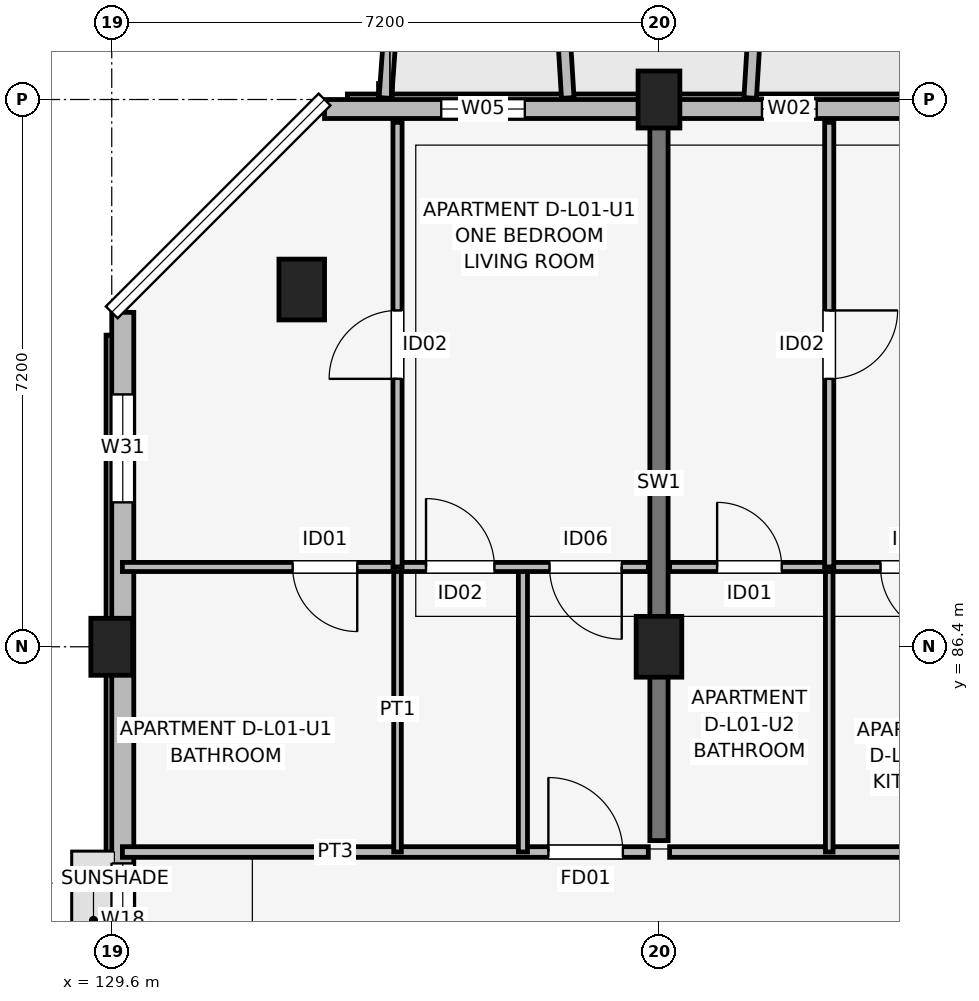
"""IFC4 building model, lengths in metres.
Left out: names, types, materials, properties, quantities, classifications, styles, units other than length and angle.
Written with IfcOpenShell. Run it as: python <this file> out.ifc"""

import sys

from ifc_helpers import new_model, si_unit, direction, frame, frame_2d, origin, origin_2d, place, context, subcontext, project, spatial, rectangle, extrude, element, fill, save


model = new_model("IFC4")
c1 = context("Model", 3, precision=1e-05, world=origin(), true_north=direction((0.0, 1.0)))
c2 = subcontext(c1, "Body", "Model", "MODEL_VIEW")
j1 = project(units=[si_unit("LENGTHUNIT", "METRE"), si_unit("PLANEANGLEUNIT", "RADIAN")], contexts=[c1])
p1 = place(None, origin())
s1 = spatial("IfcSite", under=j1, at=p1, CompositionType="ELEMENT")
p2 = place(p1, origin())
s2 = spatial("IfcBuilding", under=s1, at=p2, CompositionType="ELEMENT")
p3 = place(p2, frame((0.0, 0.0, 4.5)))
s3 = spatial("IfcBuildingStorey", under=s2, at=p3, CompositionType="ELEMENT", Elevation=4.5)
p4 = place(p3, frame((129.6, 86.4, 0.0), z_axis=(0.0, 0.0, 1.0), x_axis=(1.0, 0.0, 0.0)))
e1 = element("IfcColumn", 1, at=p4, inside=s3, PredefinedType="COLUMN", context=c2, shape_type="SweptSolid", body=[
    extrude(rectangle(XDim=0.55, YDim=0.75, at=origin_2d()), origin(), (0.0, 0.0, 1.0), 4.2),
])
for number, where, z_axis, x_axis in (
    (2, (132.1, 91.1, 0.0), (0.0, 0.0, 1.0), (1.0, 0.0, 0.0)),
    (3, (136.8, 86.4, 0.0), (0.0, 0.0, 1.0), (1.0, 0.0, 0.0)),
):
    element("IfcColumn", number, at=place(p3, frame(where, z_axis=z_axis, x_axis=x_axis)), inside=s3, PredefinedType="COLUMN", context=c2, shape_type="SweptSolid", body=[
        extrude(rectangle(XDim=0.6, YDim=0.8, at=origin_2d()), origin(), (0.0, 0.0, 1.0), 4.2),
    ])
p5 = place(p3, frame((136.8, 93.6, 0.0), z_axis=(0.0, 0.0, 1.0), x_axis=(1.0, 0.0, 0.0)))
e4 = element("IfcColumn", 4, at=p5, inside=s3, PredefinedType="COLUMN", context=c2, shape_type="SweptSolid", body=[
    extrude(rectangle(XDim=0.55, YDim=0.75, at=origin_2d()), origin(), (0.0, 0.0, 1.0), 4.2),
])
p6 = place(p3, frame((136.8, 83.85, 0.0), z_axis=(0.0, 0.0, 1.0), x_axis=(0.0, 1.0, 0.0)))
e5 = element("IfcWall", 5, at=p6, inside=s3, PredefinedType="SHEAR", context=c2, shape_type="SweptSolid", body=[
    extrude(rectangle(XDim=9.4, YDim=0.24, at=frame_2d((4.7, 0.0))), origin(), (0.0, 0.0, 1.0), 4.2),
])
p7 = place(p3, frame((162.8, 93.475, 0.0), z_axis=(0.0, 0.0, 1.0), x_axis=(-1.0, 0.0, 0.0)))
e6 = element("IfcWall", 6, at=p7, inside=s3, PredefinedType="SOLIDWALL", context=c2, shape_type="SweptSolid", body=[
    extrude(rectangle(XDim=30.4, YDim=0.25, at=frame_2d((15.2, 0.0))), origin(), (0.0, 0.0, 1.0), 3.48),
])
p8 = place(p7, frame((21.95, 0.0, 0.0), z_axis=(0.0, 0.0, 1.0), x_axis=(-1.0, 0.0, 0.0)))
e7 = element("IfcOpeningElement", 7, at=p8, cuts=e6, PredefinedType="OPENING", context=c2, shape_type="SweptSolid", body=[
    extrude(rectangle(XDim=1.5, YDim=2.15, at=frame_2d((0.75, 1.075))), frame((0.0, 0.135, 0.0), z_axis=(0.0, -1.0, 0.0), x_axis=(1.0, 0.0, 0.0)), (0.0, 0.0, 1.0), 0.27),
])
p9 = place(p7, frame((7.7, 0.0, 0.0), z_axis=(0.0, 0.0, 1.0), x_axis=(-1.0, 0.0, 0.0)))
e8 = element("IfcOpeningElement", 8, at=p9, cuts=e6, PredefinedType="OPENING", context=c2, shape_type="SweptSolid", body=[
    extrude(rectangle(XDim=1.8, YDim=2.15, at=frame_2d((0.9, 1.075))), frame((0.0, 0.135, 0.0), z_axis=(0.0, -1.0, 0.0), x_axis=(1.0, 0.0, 0.0)), (0.0, 0.0, 1.0), 0.27),
])
p10 = place(p7, frame((27.765, 0.0, 0.75)))
e9 = element("IfcOpeningElement", 9, at=p10, cuts=e6, PredefinedType="OPENING", context=c2, shape_type="SweptSolid", body=[
    extrude(rectangle(XDim=1.1, YDim=1.5, at=frame_2d((0.55, 0.75))), frame((0.0, 0.135, 0.0), z_axis=(0.0, -1.0, 0.0), x_axis=(1.0, 0.0, 0.0)), (0.0, 0.0, 1.0), 0.27),
])
p11 = place(p7, frame((23.925, 0.0, 0.75)))
e10 = element("IfcOpeningElement", 10, at=p11, cuts=e6, PredefinedType="OPENING", context=c2, shape_type="SweptSolid", body=[
    extrude(rectangle(XDim=0.72, YDim=1.35, at=frame_2d((0.36, 0.675))), frame((0.0, 0.135, 0.0), z_axis=(0.0, -1.0, 0.0), x_axis=(1.0, 0.0, 0.0)), (0.0, 0.0, 1.0), 0.27),
])
p12 = place(p7, frame((15.325, 0.0, 0.7)))
e11 = element("IfcOpeningElement", 11, at=p12, cuts=e6, PredefinedType="OPENING", context=c2, shape_type="SweptSolid", body=[
    extrude(rectangle(XDim=2.15, YDim=1.65, at=frame_2d((1.075, 0.825))), frame((0.0, 0.135, 0.0), z_axis=(0.0, -1.0, 0.0), x_axis=(1.0, 0.0, 0.0)), (0.0, 0.0, 1.0), 0.27),
])
p13 = place(p7, frame((9.525, 0.0, 0.75)))
e12 = element("IfcOpeningElement", 12, at=p13, cuts=e6, PredefinedType="OPENING", context=c2, shape_type="SweptSolid", body=[
    extrude(rectangle(XDim=0.72, YDim=1.35, at=frame_2d((0.36, 0.675))), frame((0.0, 0.135, 0.0), z_axis=(0.0, -1.0, 0.0), x_axis=(1.0, 0.0, 0.0)), (0.0, 0.0, 1.0), 0.27),
])
p14 = place(p7, frame((1.04, 0.0, 0.7)))
e13 = element("IfcOpeningElement", 13, at=p14, cuts=e6, PredefinedType="OPENING", context=c2, shape_type="SweptSolid", body=[
    extrude(rectangle(XDim=1.92, YDim=1.72, at=frame_2d((0.96, 0.86))), frame((0.0, 0.135, 0.0), z_axis=(0.0, -1.0, 0.0), x_axis=(1.0, 0.0, 0.0)), (0.0, 0.0, 1.0), 0.27),
])
p15 = place(p3, frame((129.745, 90.8, 0.0), z_axis=(0.0, 0.0, 1.0), x_axis=(0.0, -1.0, 0.0)))
e14 = element("IfcWall", 14, at=p15, inside=s3, PredefinedType="SOLIDWALL", context=c2, shape_type="SweptSolid", body=[
    extrude(rectangle(XDim=16.0, YDim=0.29, at=frame_2d((8.0, 0.0))), origin(), (0.0, 0.0, 1.0), 3.43),
])
p16 = place(p15, frame((15.25, 0.0, 0.0), z_axis=(0.0, 0.0, 1.0), x_axis=(-1.0, 0.0, 0.0)))
e15 = element("IfcOpeningElement", 15, at=p16, cuts=e14, PredefinedType="OPENING", context=c2, shape_type="SweptSolid", body=[
    extrude(rectangle(XDim=1.1, YDim=2.15, at=frame_2d((0.55, 1.075))), frame((0.0, 0.155, 0.0), z_axis=(0.0, -1.0, 0.0), x_axis=(1.0, 0.0, 0.0)), (0.0, 0.0, 1.0), 0.31),
])
p17 = place(p15, frame((7.25, 0.0, 1.05)))
e16 = element("IfcOpeningElement", 16, at=p17, cuts=e14, PredefinedType="OPENING", context=c2, shape_type="SweptSolid", body=[
    extrude(rectangle(XDim=1.5, YDim=1.15, at=frame_2d((0.75, 0.575))), frame((0.0, 0.155, 0.0), z_axis=(0.0, -1.0, 0.0), x_axis=(1.0, 0.0, 0.0)), (0.0, 0.0, 1.0), 0.31),
])
p18 = place(p15, frame((1.08, 0.0, 0.75)))
e17 = element("IfcOpeningElement", 17, at=p18, cuts=e14, PredefinedType="OPENING", context=c2, shape_type="SweptSolid", body=[
    extrude(rectangle(XDim=1.42, YDim=1.6, at=frame_2d((0.71, 0.8))), frame((0.0, 0.155, 0.0), z_axis=(0.0, -1.0, 0.0), x_axis=(1.0, 0.0, 0.0)), (0.0, 0.0, 1.0), 0.31),
])
p19 = place(p3, frame((133.2, 93.62, 0.0), z_axis=(0.0, 0.0, 1.0), x_axis=(0.071317687608, 0.997453651772, 0.0)))
e18 = element("IfcWall", 18, at=p19, inside=s3, PredefinedType="ELEMENTEDWALL", context=c2, shape_type="SweptSolid", body=[
    extrude(rectangle(XDim=1.965, YDim=0.165, at=frame_2d((0.982, 0.0))), origin(), (0.0, 0.0, 1.0), 4.0),
])
p20 = place(p3, frame((135.6, 93.62, 0.0), z_axis=(0.0, 0.0, 1.0), x_axis=(-0.061170732449, 0.998127317276, 0.0)))
e19 = element("IfcWall", 19, at=p20, inside=s3, PredefinedType="ELEMENTEDWALL", context=c2, shape_type="SweptSolid", body=[
    extrude(rectangle(XDim=1.964, YDim=0.165, at=frame_2d((0.982, 0.0))), origin(), (0.0, 0.0, 1.0), 4.0),
])
p21 = place(p3, frame((138.0, 93.62, 0.0), z_axis=(0.0, 0.0, 1.0), x_axis=(0.061170732449, 0.998127317276, 0.0)))
e20 = element("IfcWall", 20, at=p21, inside=s3, PredefinedType="ELEMENTEDWALL", context=c2, shape_type="SweptSolid", body=[
    extrude(rectangle(XDim=1.964, YDim=0.165, at=frame_2d((0.982, 0.0))), origin(), (0.0, 0.0, 1.0), 3.5),
])
p22 = place(p3, frame((129.74, 83.7, 0.0), z_axis=(0.0, 0.0, 1.0), x_axis=(1.0, 0.0, 0.0)))
e21 = element("IfcWall", 21, at=p22, inside=s3, PredefinedType="PARTITIONING", context=c2, shape_type="SweptSolid", body=[
    extrude(rectangle(XDim=6.92, YDim=0.14, at=frame_2d((3.46, 0.0))), origin(), (0.0, 0.0, 1.0), 3.25),
])
p23 = place(p22, frame((5.605, 0.0, 0.0)))
e22 = element("IfcOpeningElement", 22, at=p23, cuts=e21, PredefinedType="OPENING", context=c2, shape_type="SweptSolid", body=[
    extrude(rectangle(XDim=0.98, YDim=2.1, at=frame_2d((0.49, 1.05))), frame((0.0, 0.08, 0.0), z_axis=(0.0, -1.0, 0.0), x_axis=(1.0, 0.0, 0.0)), (0.0, 0.0, 1.0), 0.16),
])
p24 = place(p3, frame((133.36, 83.7, 0.0), z_axis=(0.0, 0.0, 1.0), x_axis=(0.0, 1.0, 0.0)))
e23 = element("IfcWall", 23, at=p24, inside=s3, PredefinedType="PARTITIONING", context=c2, shape_type="SweptSolid", body=[
    extrude(rectangle(XDim=3.75, YDim=0.1, at=frame_2d((1.875, 0.0))), origin(), (0.0, 0.0, 1.0), 3.25),
])
p25 = place(p3, frame((135.01, 83.7, 0.0), z_axis=(0.0, 0.0, 1.0), x_axis=(0.0, 1.0, 0.0)))
e24 = element("IfcWall", 24, at=p25, inside=s3, PredefinedType="PARTITIONING", context=c2, shape_type="SweptSolid", body=[
    extrude(rectangle(XDim=3.75, YDim=0.12, at=frame_2d((1.875, 0.0))), origin(), (0.0, 0.0, 1.0), 3.25),
])
p26 = place(p3, frame((129.74, 87.45, 0.0), z_axis=(0.0, 0.0, 1.0), x_axis=(1.0, 0.0, 0.0)))
e25 = element("IfcWall", 25, at=p26, inside=s3, PredefinedType="PARTITIONING", context=c2, shape_type="SweptSolid", body=[
    extrude(rectangle(XDim=6.92, YDim=0.12, at=frame_2d((3.46, 0.0))), origin(), (0.0, 0.0, 1.0), 3.25),
])
p27 = place(p26, frame((3.09, 0.0, 0.0), z_axis=(0.0, 0.0, 1.0), x_axis=(-1.0, 0.0, 0.0)))
e26 = element("IfcOpeningElement", 26, at=p27, cuts=e25, PredefinedType="OPENING", context=c2, shape_type="SweptSolid", body=[
    extrude(rectangle(XDim=0.85, YDim=2.08, at=frame_2d((0.425, 1.04))), frame((0.0, 0.07, 0.0), z_axis=(0.0, -1.0, 0.0), x_axis=(1.0, 0.0, 0.0)), (0.0, 0.0, 1.0), 0.14),
])
p28 = place(p26, frame((3.995, 0.0, 0.0)))
e27 = element("IfcOpeningElement", 27, at=p28, cuts=e25, PredefinedType="OPENING", context=c2, shape_type="SweptSolid", body=[
    extrude(rectangle(XDim=0.9, YDim=2.08, at=frame_2d((0.45, 1.04))), frame((0.0, 0.07, 0.0), z_axis=(0.0, -1.0, 0.0), x_axis=(1.0, 0.0, 0.0)), (0.0, 0.0, 1.0), 0.14),
])
p29 = place(p26, frame((6.57, 0.0, 0.0), z_axis=(0.0, 0.0, 1.0), x_axis=(-1.0, 0.0, 0.0)))
e28 = element("IfcOpeningElement", 28, at=p29, cuts=e25, PredefinedType="OPENING", context=c2, shape_type="SweptSolid", body=[
    extrude(rectangle(XDim=0.95, YDim=2.08, at=frame_2d((0.475, 1.04))), frame((0.0, 0.07, 0.0), z_axis=(0.0, -1.0, 0.0), x_axis=(1.0, 0.0, 0.0)), (0.0, 0.0, 1.0), 0.14),
])
p30 = place(p3, frame((133.36, 87.45, 0.0), z_axis=(0.0, 0.0, 1.0), x_axis=(0.0, 1.0, 0.0)))
e29 = element("IfcWall", 29, at=p30, inside=s3, PredefinedType="PARTITIONING", context=c2, shape_type="SweptSolid", body=[
    extrude(rectangle(XDim=5.85, YDim=0.12, at=frame_2d((2.925, 0.0))), origin(), (0.0, 0.0, 1.0), 3.25),
])
p31 = place(p30, frame((2.475, 0.0, 0.0)))
e30 = element("IfcOpeningElement", 30, at=p31, cuts=e29, PredefinedType="OPENING", context=c2, shape_type="SweptSolid", body=[
    extrude(rectangle(XDim=0.9, YDim=2.08, at=frame_2d((0.45, 1.04))), frame((0.0, 0.07, 0.0), z_axis=(0.0, -1.0, 0.0), x_axis=(1.0, 0.0, 0.0)), (0.0, 0.0, 1.0), 0.14),
])
p32 = place(p3, frame((136.94, 83.7, 0.0), z_axis=(0.0, 0.0, 1.0), x_axis=(1.0, 0.0, 0.0)))
e31 = element("IfcWall", 31, at=p32, inside=s3, PredefinedType="PARTITIONING", context=c2, shape_type="SweptSolid", body=[
    extrude(rectangle(XDim=6.92, YDim=0.14, at=frame_2d((3.46, 0.0))), origin(), (0.0, 0.0, 1.0), 3.25),
])
p33 = place(p32, frame((6.125, 0.0, 0.0), z_axis=(0.0, 0.0, 1.0), x_axis=(-1.0, 0.0, 0.0)))
e32 = element("IfcOpeningElement", 32, at=p33, cuts=e31, PredefinedType="OPENING", context=c2, shape_type="SweptSolid", body=[
    extrude(rectangle(XDim=0.98, YDim=2.1, at=frame_2d((0.49, 1.05))), frame((0.0, 0.08, 0.0), z_axis=(0.0, -1.0, 0.0), x_axis=(1.0, 0.0, 0.0)), (0.0, 0.0, 1.0), 0.16),
])
p34 = place(p3, frame((139.04, 83.7, 0.0), z_axis=(0.0, 0.0, 1.0), x_axis=(0.0, 1.0, 0.0)))
e33 = element("IfcWall", 33, at=p34, inside=s3, PredefinedType="PARTITIONING", context=c2, shape_type="SweptSolid", body=[
    extrude(rectangle(XDim=3.75, YDim=0.1, at=frame_2d((1.875, 0.0))), origin(), (0.0, 0.0, 1.0), 3.25),
])
p35 = place(p3, frame((136.94, 87.45, 0.0), z_axis=(0.0, 0.0, 1.0), x_axis=(1.0, 0.0, 0.0)))
e34 = element("IfcWall", 34, at=p35, inside=s3, PredefinedType="PARTITIONING", context=c2, shape_type="SweptSolid", body=[
    extrude(rectangle(XDim=6.92, YDim=0.12, at=frame_2d((3.46, 0.0))), origin(), (0.0, 0.0, 1.0), 3.25),
])
p36 = place(p35, frame((0.625, 0.0, 0.0)))
e35 = element("IfcOpeningElement", 35, at=p36, cuts=e34, PredefinedType="OPENING", context=c2, shape_type="SweptSolid", body=[
    extrude(rectangle(XDim=0.85, YDim=2.08, at=frame_2d((0.425, 1.04))), frame((0.0, 0.07, 0.0), z_axis=(0.0, -1.0, 0.0), x_axis=(1.0, 0.0, 0.0)), (0.0, 0.0, 1.0), 0.14),
])
p37 = place(p35, frame((3.675, 0.0, 0.0), z_axis=(0.0, 0.0, 1.0), x_axis=(-1.0, 0.0, 0.0)))
e36 = element("IfcOpeningElement", 36, at=p37, cuts=e34, PredefinedType="OPENING", context=c2, shape_type="SweptSolid", body=[
    extrude(rectangle(XDim=0.9, YDim=2.08, at=frame_2d((0.45, 1.04))), frame((0.0, 0.07, 0.0), z_axis=(0.0, -1.0, 0.0), x_axis=(1.0, 0.0, 0.0)), (0.0, 0.0, 1.0), 0.14),
])
p38 = place(p35, frame((5.16, 0.0, 0.0)))
e37 = element("IfcOpeningElement", 37, at=p38, cuts=e34, PredefinedType="OPENING", context=c2, shape_type="SweptSolid", body=[
    extrude(rectangle(XDim=0.95, YDim=2.08, at=frame_2d((0.475, 1.04))), frame((0.0, 0.07, 0.0), z_axis=(0.0, -1.0, 0.0), x_axis=(1.0, 0.0, 0.0)), (0.0, 0.0, 1.0), 0.14),
])
p39 = place(p3, frame((139.04, 87.45, 0.0), z_axis=(0.0, 0.0, 1.0), x_axis=(0.0, 1.0, 0.0)))
e38 = element("IfcWall", 38, at=p39, inside=s3, PredefinedType="PARTITIONING", context=c2, shape_type="SweptSolid", body=[
    extrude(rectangle(XDim=5.85, YDim=0.12, at=frame_2d((2.925, 0.0))), origin(), (0.0, 0.0, 1.0), 3.25),
])
p40 = place(p39, frame((3.375, 0.0, 0.0), z_axis=(0.0, 0.0, 1.0), x_axis=(-1.0, 0.0, 0.0)))
e39 = element("IfcOpeningElement", 39, at=p40, cuts=e38, PredefinedType="OPENING", context=c2, shape_type="SweptSolid", body=[
    extrude(rectangle(XDim=0.9, YDim=2.08, at=frame_2d((0.45, 1.04))), frame((0.0, 0.07, 0.0), z_axis=(0.0, -1.0, 0.0), x_axis=(1.0, 0.0, 0.0)), (0.0, 0.0, 1.0), 0.14),
])
p41 = place(p10, origin())
e40 = element("IfcWindow", 40, at=p41, inside=s3, PartitioningType="SINGLE_PANEL", PredefinedType="WINDOW", context=c2, shape_type="SweptSolid", body=[
    extrude(rectangle(XDim=1.1, YDim=1.5, at=frame_2d((0.55, 0.75))), frame((0.0, 0.03, 0.0), z_axis=(0.0, -1.0, 0.0), x_axis=(1.0, 0.0, 0.0)), (0.0, 0.0, 1.0), 0.06),
])
fill(e9, e40)
p42 = place(p11, origin())
e41 = element("IfcWindow", 41, at=p42, inside=s3, PartitioningType="SINGLE_PANEL", PredefinedType="WINDOW", context=c2, shape_type="SweptSolid", body=[
    extrude(rectangle(XDim=0.72, YDim=1.35, at=frame_2d((0.36, 0.675))), frame((0.0, 0.03, 0.0), z_axis=(0.0, -1.0, 0.0), x_axis=(1.0, 0.0, 0.0)), (0.0, 0.0, 1.0), 0.06),
])
fill(e10, e41)
p43 = place(p17, origin())
e42 = element("IfcWindow", 42, at=p43, inside=s3, PartitioningType="SINGLE_PANEL", PredefinedType="WINDOW", context=c2, shape_type="SweptSolid", body=[
    extrude(rectangle(XDim=1.5, YDim=1.15, at=frame_2d((0.75, 0.575))), frame((0.0, 0.03, 0.0), z_axis=(0.0, -1.0, 0.0), x_axis=(1.0, 0.0, 0.0)), (0.0, 0.0, 1.0), 0.06),
])
fill(e16, e42)
p44 = place(p18, origin())
e43 = element("IfcWindow", 43, at=p44, inside=s3, PartitioningType="SINGLE_PANEL", PredefinedType="WINDOW", context=c2, shape_type="SweptSolid", body=[
    extrude(rectangle(XDim=1.42, YDim=1.6, at=frame_2d((0.71, 0.8))), frame((0.0, 0.03, 0.0), z_axis=(0.0, -1.0, 0.0), x_axis=(1.0, 0.0, 0.0)), (0.0, 0.0, 1.0), 0.06),
])
fill(e17, e43)
p45 = place(p23, origin())
e44 = element("IfcDoor", 44, at=p45, inside=s3, OperationType="SINGLE_SWING_LEFT", PredefinedType="DOOR", context=c2, shape_type="SweptSolid", body=[
    extrude(rectangle(XDim=0.98, YDim=2.1, at=frame_2d((0.49, 1.05))), frame((0.0, 0.025, 0.0), z_axis=(0.0, -1.0, 0.0), x_axis=(1.0, 0.0, 0.0)), (0.0, 0.0, 1.0), 0.05),
])
fill(e22, e44)
p46 = place(p27, origin())
e45 = element("IfcDoor", 45, at=p46, inside=s3, OperationType="SINGLE_SWING_RIGHT", PredefinedType="DOOR", context=c2, shape_type="SweptSolid", body=[
    extrude(rectangle(XDim=0.85, YDim=2.08, at=frame_2d((0.425, 1.04))), frame((0.0, 0.025, 0.0), z_axis=(0.0, -1.0, 0.0), x_axis=(1.0, 0.0, 0.0)), (0.0, 0.0, 1.0), 0.05),
])
fill(e26, e45)
p47 = place(p28, origin())
e46 = element("IfcDoor", 46, at=p47, inside=s3, OperationType="SINGLE_SWING_LEFT", PredefinedType="DOOR", context=c2, shape_type="SweptSolid", body=[
    extrude(rectangle(XDim=0.9, YDim=2.08, at=frame_2d((0.45, 1.04))), frame((0.0, 0.025, 0.0), z_axis=(0.0, -1.0, 0.0), x_axis=(1.0, 0.0, 0.0)), (0.0, 0.0, 1.0), 0.05),
])
fill(e27, e46)
p48 = place(p29, origin())
e47 = element("IfcDoor", 47, at=p48, inside=s3, OperationType="SINGLE_SWING_RIGHT", PredefinedType="DOOR", context=c2, shape_type="SweptSolid", body=[
    extrude(rectangle(XDim=0.95, YDim=2.08, at=frame_2d((0.475, 1.04))), frame((0.0, 0.025, 0.0), z_axis=(0.0, -1.0, 0.0), x_axis=(1.0, 0.0, 0.0)), (0.0, 0.0, 1.0), 0.05),
])
fill(e28, e47)
p49 = place(p31, origin())
e48 = element("IfcDoor", 48, at=p49, inside=s3, OperationType="SINGLE_SWING_LEFT", PredefinedType="DOOR", context=c2, shape_type="SweptSolid", body=[
    extrude(rectangle(XDim=0.9, YDim=2.08, at=frame_2d((0.45, 1.04))), frame((0.0, 0.025, 0.0), z_axis=(0.0, -1.0, 0.0), x_axis=(1.0, 0.0, 0.0)), (0.0, 0.0, 1.0), 0.05),
])
fill(e30, e48)
p50 = place(p36, origin())
e49 = element("IfcDoor", 49, at=p50, inside=s3, OperationType="SINGLE_SWING_LEFT", PredefinedType="DOOR", context=c2, shape_type="SweptSolid", body=[
    extrude(rectangle(XDim=0.85, YDim=2.08, at=frame_2d((0.425, 1.04))), frame((0.0, 0.025, 0.0), z_axis=(0.0, -1.0, 0.0), x_axis=(1.0, 0.0, 0.0)), (0.0, 0.0, 1.0), 0.05),
])
fill(e35, e49)
p51 = place(p37, origin())
e50 = element("IfcDoor", 50, at=p51, inside=s3, OperationType="SINGLE_SWING_RIGHT", PredefinedType="DOOR", context=c2, shape_type="SweptSolid", body=[
    extrude(rectangle(XDim=0.9, YDim=2.08, at=frame_2d((0.45, 1.04))), frame((0.0, 0.025, 0.0), z_axis=(0.0, -1.0, 0.0), x_axis=(1.0, 0.0, 0.0)), (0.0, 0.0, 1.0), 0.05),
])
fill(e36, e50)
p52 = place(p40, origin())
e51 = element("IfcDoor", 51, at=p52, inside=s3, OperationType="SINGLE_SWING_RIGHT", PredefinedType="DOOR", context=c2, shape_type="SweptSolid", body=[
    extrude(rectangle(XDim=0.9, YDim=2.08, at=frame_2d((0.45, 1.04))), frame((0.0, 0.025, 0.0), z_axis=(0.0, -1.0, 0.0), x_axis=(1.0, 0.0, 0.0)), (0.0, 0.0, 1.0), 0.05),
])
fill(e39, e51)
save(model, sys.argv[1])
